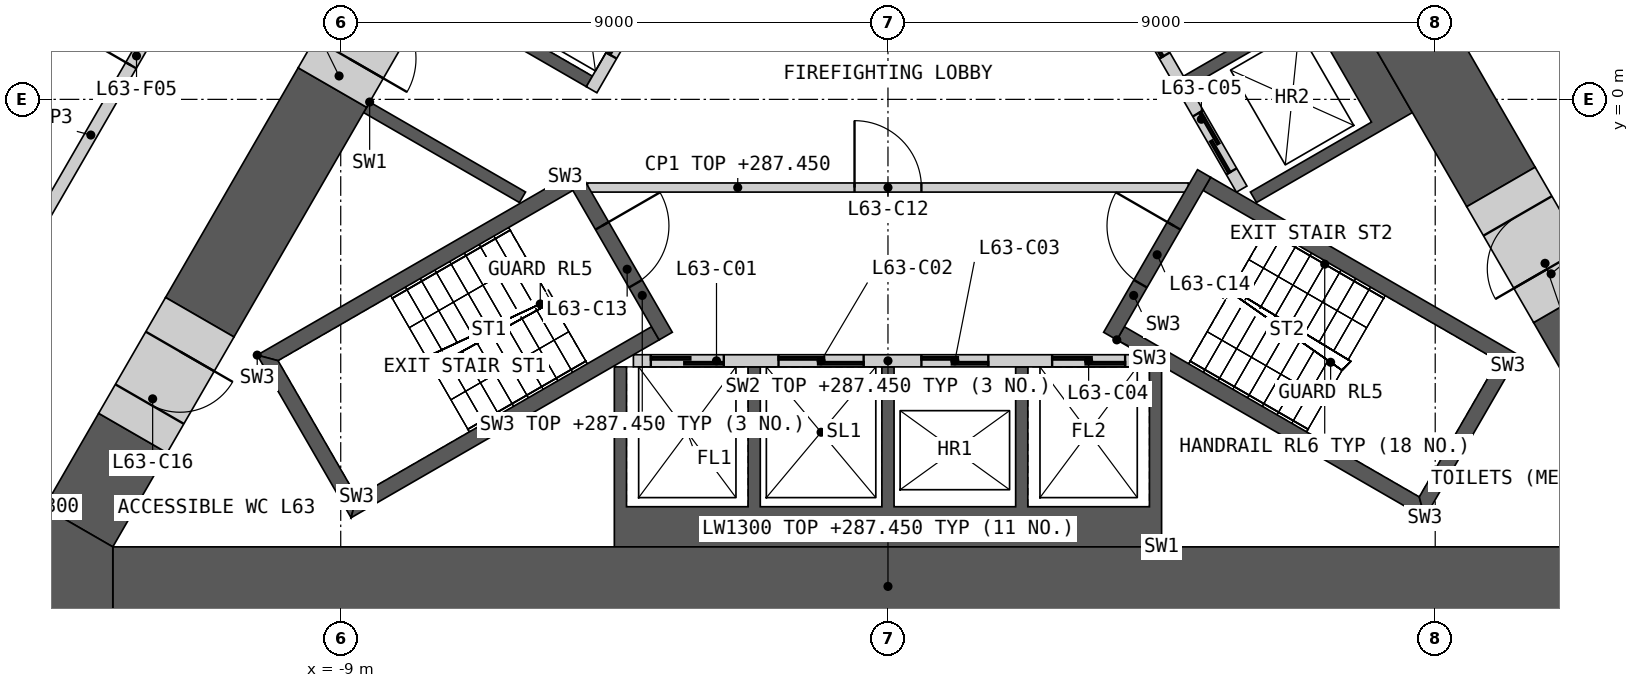
"""IFC4 building model, lengths in metres.
Left out: names, types, materials, properties, quantities, classifications, styles, units other than length and angle.
Written with IfcOpenShell. Run it as: python <this file> out.ifc"""

import sys

from ifc_helpers import new_model, si_unit, direction, frame, frame_2d, origin, place, context, subcontext, project, spatial, polyline, rectangle, outline, extrude, element, fill, save


model = new_model("IFC4")
c1 = context("Model", 3, precision=1e-05, world=origin(), true_north=direction((0.0, 1.0)))
c2 = subcontext(c1, "Body", "Model", "MODEL_VIEW")
j1 = project(units=[si_unit("LENGTHUNIT", "METRE"), si_unit("PLANEANGLEUNIT", "RADIAN")], contexts=[c1])
p1 = place(None, origin())
s1 = spatial("IfcSite", under=j1, at=p1, CompositionType="ELEMENT")
p2 = place(p1, origin())
s2 = spatial("IfcBuilding", under=s1, at=p2, CompositionType="ELEMENT")
p3 = place(p2, frame((0.0, 0.0, 277.8)))
s3 = spatial("IfcBuildingStorey", under=s2, at=p3, CompositionType="ELEMENT", Elevation=277.8)
p4 = place(p3, origin())
e1 = element("IfcWall", 1, at=p4, inside=s3, PredefinedType="SHEAR", context=c2, shape_type="SweptSolid", body=[
    extrude(outline(polyline([(4.5, -7.36), (-4.5, -7.36), (-4.5, -4.4), (-4.3, -4.4), (-4.3, -6.7), (-2.3, -6.7), (-2.3, -4.4), (-2.1, -4.4), (-2.1, -6.7), (-0.1, -6.7), (-0.1, -4.4), (0.1, -4.4), (0.1, -6.7), (2.1, -6.7), (2.1, -4.4), (2.3, -4.4), (2.3, -6.7), (4.3, -6.7), (4.3, -4.4), (4.5, -4.4), (4.5, -7.36)])), origin(), (0.0, 0.0, 1.0), 9.65),
])
p5 = place(p3, frame((-4.187, -4.3, 0.0), z_axis=(0.0, 0.0, 1.0), x_axis=(1.0, 0.0, 0.0)))
e2 = element("IfcWall", 2, at=p5, inside=s3, PredefinedType="SOLIDWALL", context=c2, shape_type="SweptSolid", body=[
    extrude(rectangle(XDim=8.373, YDim=0.2, at=frame_2d((4.187, 0.0))), origin(), (0.0, 0.0, 1.0), 9.65),
])
p6 = place(p5, frame((0.287, 0.0, 0.0)))
e3 = element("IfcOpeningElement", 3, at=p6, cuts=e2, PredefinedType="OPENING", context=c2, shape_type="SweptSolid", body=[
    extrude(rectangle(XDim=1.2, YDim=2.1, at=frame_2d((0.6, 1.05))), frame((0.0, 0.11, 0.0), z_axis=(0.0, -1.0, 0.0), x_axis=(1.0, 0.0, 0.0)), (0.0, 0.0, 1.0), 0.22),
])
p7 = place(p5, frame((2.387, 0.0, 0.0)))
e4 = element("IfcOpeningElement", 4, at=p7, cuts=e2, PredefinedType="OPENING", context=c2, shape_type="SweptSolid", body=[
    extrude(rectangle(XDim=1.4, YDim=2.1, at=frame_2d((0.7, 1.05))), frame((0.0, 0.11, 0.0), z_axis=(0.0, -1.0, 0.0), x_axis=(1.0, 0.0, 0.0)), (0.0, 0.0, 1.0), 0.22),
])
p8 = place(p5, frame((4.737, 0.0, 0.0)))
e5 = element("IfcOpeningElement", 5, at=p8, cuts=e2, PredefinedType="OPENING", context=c2, shape_type="SweptSolid", body=[
    extrude(rectangle(XDim=1.1, YDim=2.1, at=frame_2d((0.55, 1.05))), frame((0.0, 0.11, 0.0), z_axis=(0.0, -1.0, 0.0), x_axis=(1.0, 0.0, 0.0)), (0.0, 0.0, 1.0), 0.22),
])
p9 = place(p5, frame((6.887, 0.0, 0.0)))
e6 = element("IfcOpeningElement", 6, at=p9, cuts=e2, PredefinedType="OPENING", context=c2, shape_type="SweptSolid", body=[
    extrude(rectangle(XDim=1.2, YDim=2.1, at=frame_2d((0.6, 1.05))), frame((0.0, 0.11, 0.0), z_axis=(0.0, -1.0, 0.0), x_axis=(1.0, 0.0, 0.0)), (0.0, 0.0, 1.0), 0.22),
])
p10 = place(p3, origin())
e7 = element("IfcWall", 7, at=p10, inside=s3, PredefinedType="SHEAR", context=c2, shape_type="SweptSolid", body=[
    extrude(outline(polyline([(4.124, 7.577), (8.624, -0.217), (8.231, -0.444), (6.061, -1.697), (5.96, -1.524), (7.952, -0.374), (6.952, 1.358), (4.96, 0.208), (4.861, 0.381), (6.852, 1.531), (5.852, 3.263), (3.861, 2.113), (3.76, 2.287), (5.752, 3.437), (4.752, 5.169), (2.76, 4.019), (2.66, 4.192), (4.652, 5.342), (3.652, 7.074), (1.66, 5.924), (1.561, 6.097), (3.731, 7.35), (4.124, 7.577)])), origin(), (0.0, 0.0, 1.0), 9.65),
])
p11 = place(p3, frame((5.817, -1.476, 0.0), z_axis=(0.0, 0.0, 1.0), x_axis=(-0.500002616675, 0.866023893041, 0.0)))
e8 = element("IfcWall", 8, at=p11, inside=s3, PredefinedType="SOLIDWALL", context=c2, shape_type="SweptSolid", body=[
    extrude(rectangle(XDim=8.373, YDim=0.2, at=frame_2d((4.187, 0.0))), origin(), (0.0, 0.0, 1.0), 9.65),
])
p12 = place(p11, frame((0.337, 0.0, 0.0)))
e9 = element("IfcOpeningElement", 9, at=p12, cuts=e8, PredefinedType="OPENING", context=c2, shape_type="SweptSolid", body=[
    extrude(rectangle(XDim=1.1, YDim=2.1, at=frame_2d((0.55, 1.05))), frame((0.0, 0.11, 0.0), z_axis=(0.0, -1.0, 0.0), x_axis=(1.0, 0.0, 0.0)), (0.0, 0.0, 1.0), 0.22),
])
p13 = place(p11, frame((2.537, 0.0, 0.0)))
e10 = element("IfcOpeningElement", 10, at=p13, cuts=e8, PredefinedType="OPENING", context=c2, shape_type="SweptSolid", body=[
    extrude(rectangle(XDim=1.1, YDim=2.1, at=frame_2d((0.55, 1.05))), frame((0.0, 0.11, 0.0), z_axis=(0.0, -1.0, 0.0), x_axis=(1.0, 0.0, 0.0)), (0.0, 0.0, 1.0), 0.22),
])
p14 = place(p11, frame((4.737, 0.0, 0.0)))
e11 = element("IfcOpeningElement", 11, at=p14, cuts=e8, PredefinedType="OPENING", context=c2, shape_type="SweptSolid", body=[
    extrude(rectangle(XDim=1.1, YDim=2.1, at=frame_2d((0.55, 1.05))), frame((0.0, 0.11, 0.0), z_axis=(0.0, -1.0, 0.0), x_axis=(1.0, 0.0, 0.0)), (0.0, 0.0, 1.0), 0.22),
])
p15 = place(p11, frame((6.937, 0.0, 0.0)))
e12 = element("IfcOpeningElement", 12, at=p15, cuts=e8, PredefinedType="OPENING", context=c2, shape_type="SweptSolid", body=[
    extrude(rectangle(XDim=1.1, YDim=2.1, at=frame_2d((0.55, 1.05))), frame((0.0, 0.11, 0.0), z_axis=(0.0, -1.0, 0.0), x_axis=(1.0, 0.0, 0.0)), (0.0, 0.0, 1.0), 0.22),
])
p16 = place(p3, origin())
e13 = element("IfcWall", 13, at=p16, inside=s3, PredefinedType="SHEAR", context=c2, shape_type="SweptSolid", body=[
    extrude(outline(polyline([(-7.524, 1.688), (-4.124, 7.577), (-3.731, 7.35), (-1.561, 6.097), (-1.66, 5.924), (-3.652, 7.074), (-4.652, 5.342), (-2.66, 4.192), (-2.76, 4.019), (-4.752, 5.169), (-5.752, 3.437), (-3.76, 2.287), (-3.861, 2.113), (-5.852, 3.263), (-6.852, 1.531), (-4.861, 0.381), (-4.96, 0.208), (-7.131, 1.461), (-7.524, 1.688)])), origin(), (0.0, 0.0, 1.0), 9.65),
])
p17 = place(p3, origin())
e14 = element("IfcWall", 14, at=p17, inside=s3, PredefinedType="SHEAR", context=c2, shape_type="SweptSolid", body=[
    extrude(outline(polyline([(-8.524, -0.044), (-8.131, -0.271), (-5.96, -1.524), (-6.061, -1.697), (-8.231, -0.444), (-8.624, -0.217), (-8.524, -0.044)])), origin(), (0.0, 0.0, 1.0), 9.65),
])
p18 = place(p3, frame((-1.631, 5.776, 0.0), z_axis=(0.0, 0.0, 1.0), x_axis=(-0.499992876559, -0.866029516466, 0.0)))
e15 = element("IfcWall", 15, at=p18, inside=s3, PredefinedType="SOLIDWALL", context=c2, shape_type="SweptSolid", body=[
    extrude(rectangle(XDim=6.486, YDim=0.2, at=frame_2d((3.243, 0.0))), origin(), (0.0, 0.0, 1.0), 9.65),
])
p19 = place(p18, frame((0.337, 0.0, 0.0)))
e16 = element("IfcOpeningElement", 16, at=p19, cuts=e15, PredefinedType="OPENING", context=c2, shape_type="SweptSolid", body=[
    extrude(rectangle(XDim=1.1, YDim=2.1, at=frame_2d((0.55, 1.05))), frame((0.0, 0.11, 0.0), z_axis=(0.0, -1.0, 0.0), x_axis=(1.0, 0.0, 0.0)), (0.0, 0.0, 1.0), 0.22),
])
p20 = place(p18, frame((2.537, 0.0, 0.0)))
e17 = element("IfcOpeningElement", 17, at=p20, cuts=e15, PredefinedType="OPENING", context=c2, shape_type="SweptSolid", body=[
    extrude(rectangle(XDim=1.1, YDim=2.1, at=frame_2d((0.55, 1.05))), frame((0.0, 0.11, 0.0), z_axis=(0.0, -1.0, 0.0), x_axis=(1.0, 0.0, 0.0)), (0.0, 0.0, 1.0), 0.22),
])
p21 = place(p18, frame((4.737, 0.0, 0.0)))
e18 = element("IfcOpeningElement", 18, at=p21, cuts=e15, PredefinedType="OPENING", context=c2, shape_type="SweptSolid", body=[
    extrude(rectangle(XDim=1.1, YDim=2.1, at=frame_2d((0.55, 1.05))), frame((0.0, 0.11, 0.0), z_axis=(0.0, -1.0, 0.0), x_axis=(1.0, 0.0, 0.0)), (0.0, 0.0, 1.0), 0.22),
])
p22 = place(p3, frame((-4.941, -1.45, 0.0), z_axis=(0.0, 0.0, 1.0), x_axis=(1.0, 0.0, 0.0)))
e19 = element("IfcWall", 19, at=p22, inside=s3, PredefinedType="PARTITIONING", context=c2, shape_type="SweptSolid", body=[
    extrude(rectangle(XDim=9.882, YDim=0.15, at=frame_2d((4.941, 0.0))), origin(), (0.0, 0.0, 1.0), 9.65),
])
p23 = place(p22, frame((4.391, 0.0, 0.0)))
e20 = element("IfcOpeningElement", 20, at=p23, cuts=e19, PredefinedType="OPENING", context=c2, shape_type="SweptSolid", body=[
    extrude(rectangle(XDim=1.1, YDim=2.1, at=frame_2d((0.55, 1.05))), frame((0.0, 0.085, 0.0), z_axis=(0.0, -1.0, 0.0), x_axis=(1.0, 0.0, 0.0)), (0.0, 0.0, 1.0), 0.17),
])
p24 = place(p3, origin())
e21 = element("IfcWall", 21, at=p24, inside=s3, PredefinedType="SHEAR", context=c2, shape_type="SweptSolid", body=[
    extrude(outline(polyline([(-5.307, -1.281), (-10.374, -4.206), (-10.032, -4.298), (-5.182, -1.498), (-5.307, -1.281)])), origin(), (0.0, 0.0, 1.0), 9.65),
])
p25 = place(p3, origin())
e22 = element("IfcWall", 22, at=p25, inside=s3, PredefinedType="SHEAR", context=c2, shape_type="SweptSolid", body=[
    extrude(outline(polyline([(-10.374, -4.206), (-8.83, -6.881), (-8.738, -6.539), (-10.032, -4.298), (-10.374, -4.206)])), origin(), (0.0, 0.0, 1.0), 9.65),
])
p26 = place(p3, origin())
e23 = element("IfcWall", 23, at=p26, inside=s3, PredefinedType="SHEAR", context=c2, shape_type="SweptSolid", body=[
    extrude(outline(polyline([(-8.738, -6.539), (-8.83, -6.881), (-3.763, -3.956), (-3.888, -3.739), (-8.738, -6.539)])), origin(), (0.0, 0.0, 1.0), 9.65),
])
p27 = place(p3, frame((-5.199, -1.219, 0.0), z_axis=(0.0, 0.0, 1.0), x_axis=(0.499982516597, -0.866035497597, 0.0)))
e24 = element("IfcWall", 24, at=p27, inside=s3, PredefinedType="SHEAR", context=c2, shape_type="SweptSolid", body=[
    extrude(rectangle(XDim=3.088, YDim=0.25, at=frame_2d((1.544, 0.0))), origin(), (0.0, 0.0, 1.0), 9.65),
])
p28 = place(p27, frame((0.994, 0.0, 0.0)))
e25 = element("IfcOpeningElement", 25, at=p28, cuts=e24, PredefinedType="OPENING", context=c2, shape_type="SweptSolid", body=[
    extrude(rectangle(XDim=1.1, YDim=2.1, at=frame_2d((0.55, 1.05))), frame((0.0, 0.135, 0.0), z_axis=(0.0, -1.0, 0.0), x_axis=(1.0, 0.0, 0.0)), (0.0, 0.0, 1.0), 0.27),
])
p29 = place(p3, origin())
e26 = element("IfcWall", 26, at=p29, inside=s3, PredefinedType="SHEAR", context=c2, shape_type="SweptSolid", body=[
    extrude(outline(polyline([(3.763, -3.956), (8.83, -6.881), (8.738, -6.539), (3.888, -3.739), (3.763, -3.956)])), origin(), (0.0, 0.0, 1.0), 9.65),
])
p30 = place(p3, origin())
e27 = element("IfcWall", 27, at=p30, inside=s3, PredefinedType="SHEAR", context=c2, shape_type="SweptSolid", body=[
    extrude(outline(polyline([(8.83, -6.881), (10.374, -4.206), (10.032, -4.298), (8.738, -6.539), (8.83, -6.881)])), origin(), (0.0, 0.0, 1.0), 9.65),
])
p31 = place(p3, origin())
e28 = element("IfcWall", 28, at=p31, inside=s3, PredefinedType="SHEAR", context=c2, shape_type="SweptSolid", body=[
    extrude(outline(polyline([(10.032, -4.298), (10.374, -4.206), (5.307, -1.281), (5.182, -1.498), (10.032, -4.298)])), origin(), (0.0, 0.0, 1.0), 9.65),
])
p32 = place(p3, frame((3.655, -3.893, 0.0), z_axis=(0.0, 0.0, 1.0), x_axis=(0.499982516597, 0.866035497597, 0.0)))
e29 = element("IfcWall", 29, at=p32, inside=s3, PredefinedType="SHEAR", context=c2, shape_type="SweptSolid", body=[
    extrude(rectangle(XDim=3.088, YDim=0.25, at=frame_2d((1.544, 0.0))), origin(), (0.0, 0.0, 1.0), 9.65),
])
p33 = place(p32, frame((0.994, 0.0, 0.0)))
e30 = element("IfcOpeningElement", 30, at=p33, cuts=e29, PredefinedType="OPENING", context=c2, shape_type="SweptSolid", body=[
    extrude(rectangle(XDim=1.1, YDim=2.1, at=frame_2d((0.55, 1.05))), frame((0.0, 0.135, 0.0), z_axis=(0.0, -1.0, 0.0), x_axis=(1.0, 0.0, 0.0)), (0.0, 0.0, 1.0), 0.27),
])
p34 = place(p3, frame((-12.748, -8.01, 0.0), z_axis=(0.0, 0.0, 1.0), x_axis=(1.0, 0.0, 0.0)))
e31 = element("IfcWall", 31, at=p34, inside=s3, PredefinedType="SHEAR", context=c2, shape_type="SweptSolid", body=[
    extrude(rectangle(XDim=25.497, YDim=1.3, at=frame_2d((12.748, 0.0))), origin(), (0.0, 0.0, 1.0), 9.65),
])
p35 = place(p3, frame((10.081, -1.441, 0.0), z_axis=(0.0, 0.0, 1.0), x_axis=(-0.500002581376, 0.866023913421, 0.0)))
e32 = element("IfcWall", 32, at=p35, inside=s3, PredefinedType="SHEAR", context=c2, shape_type="SweptSolid", body=[
    extrude(rectangle(XDim=19.037, YDim=1.3, at=frame_2d((9.518, 0.0))), origin(), (0.0, 0.0, 1.0), 9.65),
])
p36 = place(p3, frame((13.311, -7.035, 0.0), z_axis=(0.0, 0.0, 1.0), x_axis=(-0.500003555838, 0.866023350811, 0.0)))
e33 = element("IfcWall", 33, at=p36, inside=s3, PredefinedType="SHEAR", context=c2, shape_type="SweptSolid", body=[
    extrude(rectangle(XDim=4.26, YDim=1.3, at=frame_2d((2.13, 0.0))), origin(), (0.0, 0.0, 1.0), 9.65),
])
p37 = place(p3, frame((-9.137, 0.195, 0.0), z_axis=(0.0, 0.0, 1.0), x_axis=(-0.499985697398, -0.866033661238, 0.0)))
e34 = element("IfcWall", 34, at=p37, inside=s3, PredefinedType="SHEAR", context=c2, shape_type="SweptSolid", body=[
    extrude(rectangle(XDim=4.362, YDim=1.3, at=frame_2d((2.181, 0.0))), origin(), (0.0, 0.0, 1.0), 9.65),
])
p38 = place(p3, frame((-12.418, -5.488, 0.0), z_axis=(0.0, 0.0, 1.0), x_axis=(-0.499931460552, -0.866064971437, 0.0)))
e35 = element("IfcWall", 35, at=p38, inside=s3, PredefinedType="SHEAR", context=c2, shape_type="SweptSolid", body=[
    extrude(rectangle(XDim=1.786, YDim=1.3, at=frame_2d((0.893, 0.0))), origin(), (0.0, 0.0, 1.0), 9.65),
])
p39 = place(p3, origin())
e36 = element("IfcWall", 36, at=p39, inside=s3, PredefinedType="SHEAR", context=c2, shape_type="SweptSolid", body=[
    extrude(outline(polyline([(-13.874, -6.71), (-12.748, -7.36), (-12.748, -8.66), (-15.0, -8.66), (-13.874, -6.71)])), origin(), (0.0, 0.0, 1.0), 9.65),
])
p40 = place(p3, frame((-11.318, -3.583, 0.0), z_axis=(0.0, 0.0, 1.0), x_axis=(-0.50002983664, -0.866008176907, 0.0)))
e37 = element("IfcWall", 37, at=p40, inside=s3, PredefinedType="SHEAR", context=c2, shape_type="SweptSolid", body=[
    extrude(rectangle(XDim=2.2, YDim=1.3, at=frame_2d((1.1, 0.0))), origin(), (0.0, 0.0, 1.0), 9.65),
])
p41 = place(p40, frame((0.65, 0.0, 0.0)))
e38 = element("IfcOpeningElement", 38, at=p41, cuts=e37, PredefinedType="OPENING", context=c2, shape_type="SweptSolid", body=[
    extrude(rectangle(XDim=1.0, YDim=2.1, at=frame_2d((0.5, 1.05))), frame((0.0, 0.66, 0.0), z_axis=(0.0, -1.0, 0.0), x_axis=(1.0, 0.0, 0.0)), (0.0, 0.0, 1.0), 1.32),
])
p42 = place(p3, frame((11.181, -3.346, 0.0), z_axis=(0.0, 0.0, 1.0), x_axis=(-0.499946605688, 0.86605622881, 0.0)))
e39 = element("IfcWall", 39, at=p42, inside=s3, PredefinedType="SHEAR", context=c2, shape_type="SweptSolid", body=[
    extrude(rectangle(XDim=2.2, YDim=1.3, at=frame_2d((1.1, 0.0))), origin(), (0.0, 0.0, 1.0), 9.65),
])
p43 = place(p42, frame((0.65, 0.0, 0.0)))
e40 = element("IfcOpeningElement", 40, at=p43, cuts=e39, PredefinedType="OPENING", context=c2, shape_type="SweptSolid", body=[
    extrude(rectangle(XDim=1.0, YDim=2.1, at=frame_2d((0.5, 1.05))), frame((0.0, 0.66, 0.0), z_axis=(0.0, -1.0, 0.0), x_axis=(1.0, 0.0, 0.0)), (0.0, 0.0, 1.0), 1.32),
])
p44 = place(p3, frame((-8.037, 2.1, 0.0), z_axis=(0.0, 0.0, 1.0), x_axis=(-0.50002983664, -0.866008176907, 0.0)))
e41 = element("IfcWall", 41, at=p44, inside=s3, PredefinedType="SHEAR", context=c2, shape_type="SweptSolid", body=[
    extrude(rectangle(XDim=2.2, YDim=1.3, at=frame_2d((1.1, 0.0))), origin(), (0.0, 0.0, 1.0), 9.65),
])
p45 = place(p44, frame((0.55, 0.0, 0.0)))
e42 = element("IfcOpeningElement", 42, at=p45, cuts=e41, PredefinedType="OPENING", context=c2, shape_type="SweptSolid", body=[
    extrude(rectangle(XDim=1.1, YDim=2.1, at=frame_2d((0.55, 1.05))), frame((0.0, 0.66, 0.0), z_axis=(0.0, -1.0, 0.0), x_axis=(1.0, 0.0, 0.0)), (0.0, 0.0, 1.0), 1.32),
])
p46 = place(p3, frame((9.699, 5.321, 0.0), z_axis=(0.0, 0.0, 1.0), x_axis=(0.49998193945, -0.866035830797, 0.0)))
e43 = element("IfcWall", 43, at=p46, inside=s3, PredefinedType="PARTITIONING", context=c2, shape_type="SweptSolid", body=[
    extrude(rectangle(XDim=9.094, YDim=0.2, at=frame_2d((4.547, 0.0))), origin(), (0.0, 0.0, 1.0), 9.65),
])
p47 = place(p46, frame((3.597, 0.0, 0.0)))
e44 = element("IfcOpeningElement", 44, at=p47, cuts=e43, PredefinedType="OPENING", context=c2, shape_type="SweptSolid", body=[
    extrude(rectangle(XDim=1.8, YDim=2.1, at=frame_2d((0.9, 1.05))), frame((0.0, 0.11, 0.0), z_axis=(0.0, -1.0, 0.0), x_axis=(1.0, 0.0, 0.0)), (0.0, 0.0, 1.0), 0.22),
])
p48 = place(p3, frame((-14.247, -2.556, 0.0), z_axis=(0.0, 0.0, 1.0), x_axis=(0.49998193945, 0.866035830797, 0.0)))
e45 = element("IfcWall", 45, at=p48, inside=s3, PredefinedType="PARTITIONING", context=c2, shape_type="SweptSolid", body=[
    extrude(rectangle(XDim=9.094, YDim=0.2, at=frame_2d((4.547, 0.0))), origin(), (0.0, 0.0, 1.0), 9.65),
])
p49 = place(p48, frame((3.597, 0.0, 0.0)))
e46 = element("IfcOpeningElement", 46, at=p49, cuts=e45, PredefinedType="OPENING", context=c2, shape_type="SweptSolid", body=[
    extrude(rectangle(XDim=1.8, YDim=2.1, at=frame_2d((0.9, 1.05))), frame((0.0, 0.11, 0.0), z_axis=(0.0, -1.0, 0.0), x_axis=(1.0, 0.0, 0.0)), (0.0, 0.0, 1.0), 0.22),
])
p50 = place(p6, origin())
e47 = element("IfcDoor", 47, at=p50, inside=s3, OperationType="SLIDING_TO_LEFT", PredefinedType="DOOR", context=c2, shape_type="SweptSolid", body=[
    extrude(rectangle(XDim=1.2, YDim=2.1, at=frame_2d((0.6, 1.05))), frame((0.0, 0.025, 0.0), z_axis=(0.0, -1.0, 0.0), x_axis=(1.0, 0.0, 0.0)), (0.0, 0.0, 1.0), 0.05),
])
fill(e3, e47)
p51 = place(p7, origin())
e48 = element("IfcDoor", 48, at=p51, inside=s3, OperationType="SLIDING_TO_LEFT", PredefinedType="DOOR", context=c2, shape_type="SweptSolid", body=[
    extrude(rectangle(XDim=1.4, YDim=2.1, at=frame_2d((0.7, 1.05))), frame((0.0, 0.025, 0.0), z_axis=(0.0, -1.0, 0.0), x_axis=(1.0, 0.0, 0.0)), (0.0, 0.0, 1.0), 0.05),
])
fill(e4, e48)
p52 = place(p8, origin())
e49 = element("IfcDoor", 49, at=p52, inside=s3, OperationType="SLIDING_TO_LEFT", PredefinedType="DOOR", context=c2, shape_type="SweptSolid", body=[
    extrude(rectangle(XDim=1.1, YDim=2.1, at=frame_2d((0.55, 1.05))), frame((0.0, 0.025, 0.0), z_axis=(0.0, -1.0, 0.0), x_axis=(1.0, 0.0, 0.0)), (0.0, 0.0, 1.0), 0.05),
])
fill(e5, e49)
p53 = place(p9, origin())
e50 = element("IfcDoor", 50, at=p53, inside=s3, OperationType="SLIDING_TO_LEFT", PredefinedType="DOOR", context=c2, shape_type="SweptSolid", body=[
    extrude(rectangle(XDim=1.2, YDim=2.1, at=frame_2d((0.6, 1.05))), frame((0.0, 0.025, 0.0), z_axis=(0.0, -1.0, 0.0), x_axis=(1.0, 0.0, 0.0)), (0.0, 0.0, 1.0), 0.05),
])
fill(e6, e50)
p54 = place(p12, origin())
e51 = element("IfcDoor", 51, at=p54, inside=s3, OperationType="SLIDING_TO_LEFT", PredefinedType="DOOR", context=c2, shape_type="SweptSolid", body=[
    extrude(rectangle(XDim=1.1, YDim=2.1, at=frame_2d((0.55, 1.05))), frame((0.0, 0.025, 0.0), z_axis=(0.0, -1.0, 0.0), x_axis=(1.0, 0.0, 0.0)), (0.0, 0.0, 1.0), 0.05),
])
fill(e9, e51)
p55 = place(p13, origin())
e52 = element("IfcDoor", 52, at=p55, inside=s3, OperationType="SLIDING_TO_LEFT", PredefinedType="DOOR", context=c2, shape_type="SweptSolid", body=[
    extrude(rectangle(XDim=1.1, YDim=2.1, at=frame_2d((0.55, 1.05))), frame((0.0, 0.025, 0.0), z_axis=(0.0, -1.0, 0.0), x_axis=(1.0, 0.0, 0.0)), (0.0, 0.0, 1.0), 0.05),
])
fill(e10, e52)
p56 = place(p21, origin())
e53 = element("IfcDoor", 53, at=p56, inside=s3, OperationType="SLIDING_TO_LEFT", PredefinedType="DOOR", context=c2, shape_type="SweptSolid", body=[
    extrude(rectangle(XDim=1.1, YDim=2.1, at=frame_2d((0.55, 1.05))), frame((0.0, 0.025, 0.0), z_axis=(0.0, -1.0, 0.0), x_axis=(1.0, 0.0, 0.0)), (0.0, 0.0, 1.0), 0.05),
])
fill(e18, e53)
p57 = place(p23, origin())
e54 = element("IfcDoor", 54, at=p57, inside=s3, OperationType="SINGLE_SWING_LEFT", PredefinedType="DOOR", context=c2, shape_type="SweptSolid", body=[
    extrude(rectangle(XDim=1.1, YDim=2.1, at=frame_2d((0.55, 1.05))), frame((0.0, 0.025, 0.0), z_axis=(0.0, -1.0, 0.0), x_axis=(1.0, 0.0, 0.0)), (0.0, 0.0, 1.0), 0.05),
])
fill(e20, e54)
p58 = place(p28, origin())
e55 = element("IfcDoor", 55, at=p58, inside=s3, OperationType="SINGLE_SWING_LEFT", PredefinedType="DOOR", context=c2, shape_type="SweptSolid", body=[
    extrude(rectangle(XDim=1.1, YDim=2.1, at=frame_2d((0.55, 1.05))), frame((0.0, 0.025, 0.0), z_axis=(0.0, -1.0, 0.0), x_axis=(1.0, 0.0, 0.0)), (0.0, 0.0, 1.0), 0.05),
])
fill(e25, e55)
p59 = place(p33, origin())
e56 = element("IfcDoor", 56, at=p59, inside=s3, OperationType="SINGLE_SWING_RIGHT", PredefinedType="DOOR", context=c2, shape_type="SweptSolid", body=[
    extrude(rectangle(XDim=1.1, YDim=2.1, at=frame_2d((0.55, 1.05))), frame((0.0, 0.025, 0.0), z_axis=(0.0, -1.0, 0.0), x_axis=(1.0, 0.0, 0.0)), (0.0, 0.0, 1.0), 0.05),
])
fill(e30, e56)
p60 = place(p41, origin())
e57 = element("IfcDoor", 57, at=p60, inside=s3, OperationType="SINGLE_SWING_LEFT", PredefinedType="DOOR", context=c2, shape_type="SweptSolid", body=[
    extrude(rectangle(XDim=1.0, YDim=2.1, at=frame_2d((0.5, 1.05))), frame((0.0, 0.405, 0.0), z_axis=(0.0, -1.0, 0.0), x_axis=(1.0, 0.0, 0.0)), (0.0, 0.0, 1.0), 0.05),
])
fill(e38, e57)
p61 = place(p43, origin())
e58 = element("IfcDoor", 58, at=p61, inside=s3, OperationType="SINGLE_SWING_LEFT", PredefinedType="DOOR", context=c2, shape_type="SweptSolid", body=[
    extrude(rectangle(XDim=1.0, YDim=2.1, at=frame_2d((0.5, 1.05))), frame((0.0, 0.405, 0.0), z_axis=(0.0, -1.0, 0.0), x_axis=(1.0, 0.0, 0.0)), (0.0, 0.0, 1.0), 0.05),
])
fill(e40, e58)
p62 = place(p45, origin())
e59 = element("IfcDoor", 59, at=p62, inside=s3, OperationType="SINGLE_SWING_RIGHT", PredefinedType="DOOR", context=c2, shape_type="SweptSolid", body=[
    extrude(rectangle(XDim=1.1, YDim=2.1, at=frame_2d((0.55, 1.05))), frame((0.0, 0.405, 0.0), z_axis=(0.0, -1.0, 0.0), x_axis=(1.0, 0.0, 0.0)), (0.0, 0.0, 1.0), 0.05),
])
fill(e42, e59)
p63 = place(p49, origin())
e60 = element("IfcDoor", 60, at=p63, inside=s3, OperationType="DOUBLE_DOOR_SINGLE_SWING", PredefinedType="DOOR", context=c2, shape_type="SweptSolid", body=[
    extrude(rectangle(XDim=1.8, YDim=2.1, at=frame_2d((0.9, 1.05))), frame((0.0, 0.025, 0.0), z_axis=(0.0, -1.0, 0.0), x_axis=(1.0, 0.0, 0.0)), (0.0, 0.0, 1.0), 0.05),
])
fill(e46, e60)
save(model, sys.argv[1])
